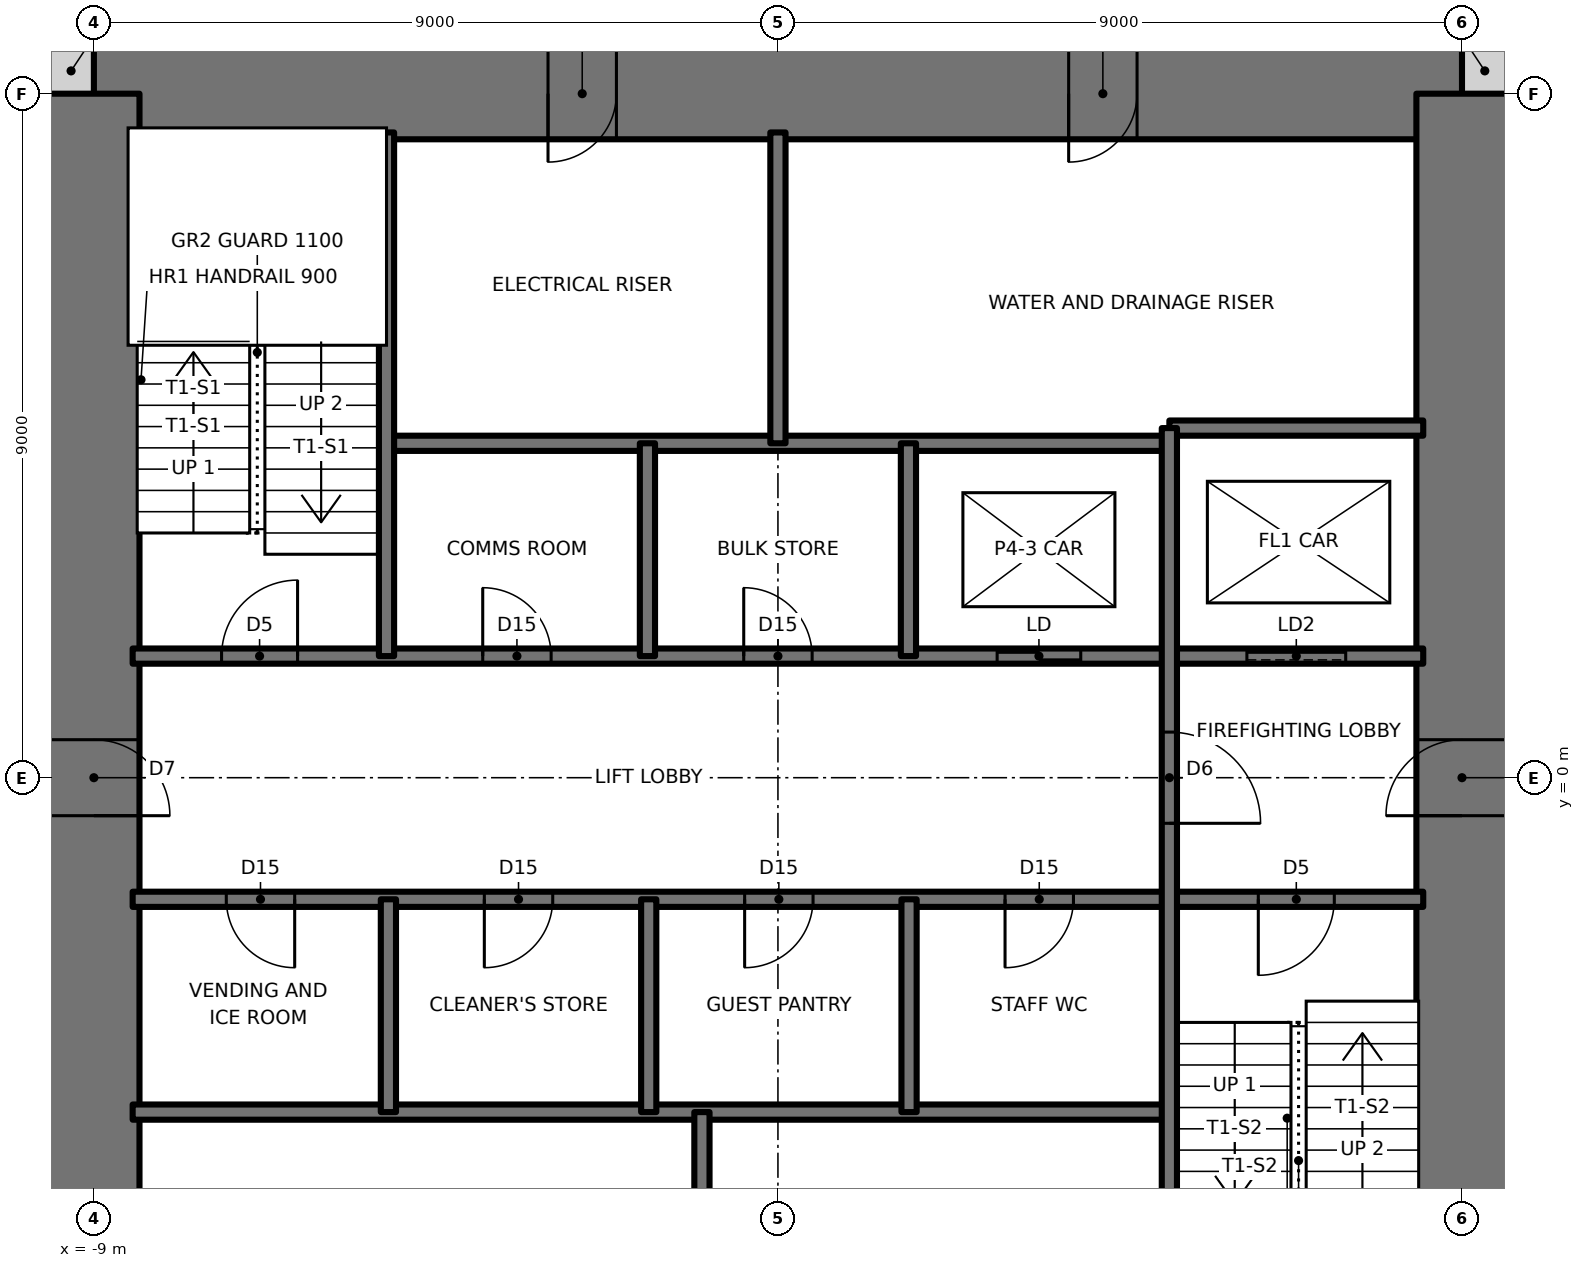
"""IFC4 building model, lengths in metres.
Left out: names, types, materials, properties, quantities, classifications, styles, units other than length and angle.
Written with IfcOpenShell. Run it as: python <this file> out.ifc"""

import sys

from ifc_helpers import new_model, si_unit, direction, frame, frame_2d, origin, place, context, subcontext, project, spatial, rectangle, extrude, element, fill, save


model = new_model("IFC4")
c1 = context("Model", 3, precision=1e-05, world=origin(), true_north=direction((0.0, 1.0)))
c2 = subcontext(c1, "Body", "Model", "MODEL_VIEW")
j1 = project(units=[si_unit("LENGTHUNIT", "METRE"), si_unit("PLANEANGLEUNIT", "RADIAN")], contexts=[c1])
p1 = place(None, origin())
s1 = spatial("IfcSite", under=j1, at=p1, CompositionType="ELEMENT")
p2 = place(p1, origin())
s2 = spatial("IfcBuilding", under=s1, at=p2, CompositionType="ELEMENT")
p3 = place(p2, frame((0.0, 0.0, 215.0)))
s3 = spatial("IfcBuildingStorey", under=s2, at=p3, CompositionType="ELEMENT", Elevation=215.0)
for number, where, z_axis, x_axis in (
    (1, (9.0, 9.3, 0.0), (0.0, 0.0, 1.0), (1.0, 0.0, 0.0)),
    (2, (-9.6, 9.3, 0.0), (0.0, 0.0, 1.0), (1.0, 0.0, 0.0)),
):
    element("IfcWall", number, at=place(p3, frame(where, z_axis=z_axis, x_axis=x_axis)), inside=s3, PredefinedType="SOLIDWALL", context=c2, shape_type="SweptSolid", body=[
        extrude(rectangle(XDim=0.6, YDim=0.6, at=frame_2d((0.3, 0.0))), origin(), (0.0, 0.0, 1.0), 3.5),
    ])
p4 = place(p3, frame((9.0, 9.0, 0.0), z_axis=(0.0, 0.0, 1.0), x_axis=(-1.0, 0.0, 0.0)))
e3 = element("IfcWall", 3, at=p4, inside=s3, PredefinedType="SHEAR", context=c2, shape_type="SweptSolid", body=[
    extrude(rectangle(XDim=18.0, YDim=1.2, at=frame_2d((9.0, 0.0))), origin(), (0.0, 0.0, 1.0), 3.5),
])
p5 = place(p4, frame((11.125, 0.0, 0.0)))
e4 = element("IfcOpeningElement", 4, at=p5, cuts=e3, PredefinedType="OPENING", context=c2, shape_type="SweptSolid", body=[
    extrude(rectangle(XDim=0.9, YDim=2.1, at=frame_2d((0.45, 1.05))), frame((0.0, 0.61, 0.0), z_axis=(0.0, -1.0, 0.0), x_axis=(1.0, 0.0, 0.0)), (0.0, 0.0, 1.0), 1.22),
])
p6 = place(p4, frame((4.275, 0.0, 0.0)))
e5 = element("IfcOpeningElement", 5, at=p6, cuts=e3, PredefinedType="OPENING", context=c2, shape_type="SweptSolid", body=[
    extrude(rectangle(XDim=0.9, YDim=2.1, at=frame_2d((0.45, 1.05))), frame((0.0, 0.61, 0.0), z_axis=(0.0, -1.0, 0.0), x_axis=(1.0, 0.0, 0.0)), (0.0, 0.0, 1.0), 1.22),
])
p7 = place(p3, frame((9.0, -9.0, 0.0), z_axis=(0.0, 0.0, 1.0), x_axis=(0.0, 1.0, 0.0)))
e6 = element("IfcWall", 6, at=p7, inside=s3, PredefinedType="SHEAR", context=c2, shape_type="SweptSolid", body=[
    extrude(rectangle(XDim=18.0, YDim=1.2, at=frame_2d((9.0, 0.0))), origin(), (0.0, 0.0, 1.0), 3.5),
])
p8 = place(p7, frame((8.5, 0.0, 0.0)))
e7 = element("IfcOpeningElement", 7, at=p8, cuts=e6, PredefinedType="OPENING", context=c2, shape_type="SweptSolid", body=[
    extrude(rectangle(XDim=1.0, YDim=2.1, at=frame_2d((0.5, 1.05))), frame((0.0, 0.61, 0.0), z_axis=(0.0, -1.0, 0.0), x_axis=(1.0, 0.0, 0.0)), (0.0, 0.0, 1.0), 1.22),
])
p9 = place(p3, frame((-9.0, 9.0, 0.0), z_axis=(0.0, 0.0, 1.0), x_axis=(0.0, -1.0, 0.0)))
e8 = element("IfcWall", 8, at=p9, inside=s3, PredefinedType="SHEAR", context=c2, shape_type="SweptSolid", body=[
    extrude(rectangle(XDim=18.0, YDim=1.2, at=frame_2d((9.0, 0.0))), origin(), (0.0, 0.0, 1.0), 3.5),
])
p10 = place(p9, frame((8.5, 0.0, 0.0)))
e9 = element("IfcOpeningElement", 9, at=p10, cuts=e8, PredefinedType="OPENING", context=c2, shape_type="SweptSolid", body=[
    extrude(rectangle(XDim=1.0, YDim=2.1, at=frame_2d((0.5, 1.05))), frame((0.0, 0.61, 0.0), z_axis=(0.0, -1.0, 0.0), x_axis=(1.0, 0.0, 0.0)), (0.0, 0.0, 1.0), 1.22),
])
p11 = place(p3, frame((-8.49, -4.4, 0.0), z_axis=(0.0, 0.0, 1.0), x_axis=(1.0, 0.0, 0.0)))
e10 = element("IfcWall", 10, at=p11, inside=s3, PredefinedType="SOLIDWALL", context=c2, shape_type="SweptSolid", body=[
    extrude(rectangle(XDim=13.64, YDim=0.2, at=frame_2d((6.82, 0.0))), origin(), (0.0, 0.0, 1.0), 3.5),
])
p12 = place(p3, frame((-8.49, -1.6, 0.0), z_axis=(0.0, 0.0, 1.0), x_axis=(1.0, 0.0, 0.0)))
e11 = element("IfcWall", 11, at=p12, inside=s3, PredefinedType="SOLIDWALL", context=c2, shape_type="SweptSolid", body=[
    extrude(rectangle(XDim=16.98, YDim=0.2, at=frame_2d((8.49, 0.0))), origin(), (0.0, 0.0, 1.0), 3.5),
])
p13 = place(p12, frame((14.81, 0.0, 0.0)))
e12 = element("IfcOpeningElement", 12, at=p13, cuts=e11, PredefinedType="OPENING", context=c2, shape_type="SweptSolid", body=[
    extrude(rectangle(XDim=1.0, YDim=2.1, at=frame_2d((0.5, 1.05))), frame((0.0, 0.11, 0.0), z_axis=(0.0, -1.0, 0.0), x_axis=(1.0, 0.0, 0.0)), (0.0, 0.0, 1.0), 0.22),
])
p14 = place(p12, frame((1.232, 0.0, 0.0)))
e13 = element("IfcOpeningElement", 13, at=p14, cuts=e11, PredefinedType="OPENING", context=c2, shape_type="SweptSolid", body=[
    extrude(rectangle(XDim=0.9, YDim=2.1, at=frame_2d((0.45, 1.05))), frame((0.0, 0.11, 0.0), z_axis=(0.0, -1.0, 0.0), x_axis=(1.0, 0.0, 0.0)), (0.0, 0.0, 1.0), 0.22),
])
p15 = place(p12, frame((4.627, 0.0, 0.0)))
e14 = element("IfcOpeningElement", 14, at=p15, cuts=e11, PredefinedType="OPENING", context=c2, shape_type="SweptSolid", body=[
    extrude(rectangle(XDim=0.9, YDim=2.1, at=frame_2d((0.45, 1.05))), frame((0.0, 0.11, 0.0), z_axis=(0.0, -1.0, 0.0), x_axis=(1.0, 0.0, 0.0)), (0.0, 0.0, 1.0), 0.22),
])
p16 = place(p12, frame((8.052, 0.0, 0.0)))
e15 = element("IfcOpeningElement", 15, at=p16, cuts=e11, PredefinedType="OPENING", context=c2, shape_type="SweptSolid", body=[
    extrude(rectangle(XDim=0.9, YDim=2.1, at=frame_2d((0.45, 1.05))), frame((0.0, 0.11, 0.0), z_axis=(0.0, -1.0, 0.0), x_axis=(1.0, 0.0, 0.0)), (0.0, 0.0, 1.0), 0.22),
])
p17 = place(p12, frame((11.478, 0.0, 0.0)))
e16 = element("IfcOpeningElement", 16, at=p17, cuts=e11, PredefinedType="OPENING", context=c2, shape_type="SweptSolid", body=[
    extrude(rectangle(XDim=0.9, YDim=2.1, at=frame_2d((0.45, 1.05))), frame((0.0, 0.11, 0.0), z_axis=(0.0, -1.0, 0.0), x_axis=(1.0, 0.0, 0.0)), (0.0, 0.0, 1.0), 0.22),
])
p18 = place(p3, frame((-8.49, 1.6, 0.0), z_axis=(0.0, 0.0, 1.0), x_axis=(1.0, 0.0, 0.0)))
e17 = element("IfcWall", 17, at=p18, inside=s3, PredefinedType="SOLIDWALL", context=c2, shape_type="SweptSolid", body=[
    extrude(rectangle(XDim=16.98, YDim=0.2, at=frame_2d((8.49, 0.0))), origin(), (0.0, 0.0, 1.0), 3.5),
])
p19 = place(p18, frame((1.17, 0.0, 0.0)))
e18 = element("IfcOpeningElement", 18, at=p19, cuts=e17, PredefinedType="OPENING", context=c2, shape_type="SweptSolid", body=[
    extrude(rectangle(XDim=1.0, YDim=2.1, at=frame_2d((0.5, 1.05))), frame((0.0, 0.11, 0.0), z_axis=(0.0, -1.0, 0.0), x_axis=(1.0, 0.0, 0.0)), (0.0, 0.0, 1.0), 0.22),
])
p20 = place(p18, frame((4.606, 0.0, 0.0)))
e19 = element("IfcOpeningElement", 19, at=p20, cuts=e17, PredefinedType="OPENING", context=c2, shape_type="SweptSolid", body=[
    extrude(rectangle(XDim=0.9, YDim=2.1, at=frame_2d((0.45, 1.05))), frame((0.0, 0.11, 0.0), z_axis=(0.0, -1.0, 0.0), x_axis=(1.0, 0.0, 0.0)), (0.0, 0.0, 1.0), 0.22),
])
p21 = place(p18, frame((8.04, 0.0, 0.0)))
e20 = element("IfcOpeningElement", 20, at=p21, cuts=e17, PredefinedType="OPENING", context=c2, shape_type="SweptSolid", body=[
    extrude(rectangle(XDim=0.9, YDim=2.1, at=frame_2d((0.45, 1.05))), frame((0.0, 0.11, 0.0), z_axis=(0.0, -1.0, 0.0), x_axis=(1.0, 0.0, 0.0)), (0.0, 0.0, 1.0), 0.22),
])
p22 = place(p18, frame((11.374, 0.0, 0.0)))
e21 = element("IfcOpeningElement", 21, at=p22, cuts=e17, PredefinedType="OPENING", context=c2, shape_type="SweptSolid", body=[
    extrude(rectangle(XDim=1.1, YDim=2.1, at=frame_2d((0.55, 1.05))), frame((0.0, 0.11, 0.0), z_axis=(0.0, -1.0, 0.0), x_axis=(1.0, 0.0, 0.0)), (0.0, 0.0, 1.0), 0.22),
])
p23 = place(p18, frame((14.66, 0.0, 0.0)))
e22 = element("IfcOpeningElement", 22, at=p23, cuts=e17, PredefinedType="OPENING", context=c2, shape_type="SweptSolid", body=[
    extrude(rectangle(XDim=1.3, YDim=2.1, at=frame_2d((0.65, 1.05))), frame((0.0, 0.11, 0.0), z_axis=(0.0, -1.0, 0.0), x_axis=(1.0, 0.0, 0.0)), (0.0, 0.0, 1.0), 0.22),
])
p24 = place(p3, frame((-5.15, 4.4, 0.0), z_axis=(0.0, 0.0, 1.0), x_axis=(1.0, 0.0, 0.0)))
e23 = element("IfcWall", 23, at=p24, inside=s3, PredefinedType="SOLIDWALL", context=c2, shape_type="SweptSolid", body=[
    extrude(rectangle(XDim=10.3, YDim=0.2, at=frame_2d((5.15, 0.0))), origin(), (0.0, 0.0, 1.0), 3.5),
])
p25 = place(p3, frame((5.15, 4.6, 0.0), z_axis=(0.0, 0.0, 1.0), x_axis=(1.0, 0.0, 0.0)))
e24 = element("IfcWall", 24, at=p25, inside=s3, PredefinedType="SOLIDWALL", context=c2, shape_type="SweptSolid", body=[
    extrude(rectangle(XDim=3.34, YDim=0.2, at=frame_2d((1.67, 0.0))), origin(), (0.0, 0.0, 1.0), 3.5),
])
p26 = place(p3, frame((5.15, -8.49, 0.0), z_axis=(0.0, 0.0, 1.0), x_axis=(0.0, 1.0, 0.0)))
e25 = element("IfcWall", 25, at=p26, inside=s3, PredefinedType="SOLIDWALL", context=c2, shape_type="SweptSolid", body=[
    extrude(rectangle(XDim=13.09, YDim=0.2, at=frame_2d((6.545, 0.0))), origin(), (0.0, 0.0, 1.0), 3.5),
])
p27 = place(p26, frame((7.89, 0.0, 0.0)))
e26 = element("IfcOpeningElement", 26, at=p27, cuts=e25, PredefinedType="OPENING", context=c2, shape_type="SweptSolid", body=[
    extrude(rectangle(XDim=1.2, YDim=2.1, at=frame_2d((0.6, 1.05))), frame((0.0, 0.11, 0.0), z_axis=(0.0, -1.0, 0.0), x_axis=(1.0, 0.0, 0.0)), (0.0, 0.0, 1.0), 0.22),
])
for number, where, z_axis, x_axis in (
    (27, (1.725, -4.4, 0.0), (0.0, 0.0, 1.0), (0.0, 1.0, 0.0)),
    (28, (1.717, 1.6, 0.0), (0.0, 0.0, 1.0), (0.0, 1.0, 0.0)),
):
    element("IfcWall", number, at=place(p3, frame(where, z_axis=z_axis, x_axis=x_axis)), inside=s3, PredefinedType="SOLIDWALL", context=c2, shape_type="SweptSolid", body=[
        extrude(rectangle(XDim=2.8, YDim=0.2, at=frame_2d((1.4, 0.0))), origin(), (0.0, 0.0, 1.0), 3.5),
    ])
for number, where, z_axis, x_axis in (
    (29, (0.0, 4.4, 0.0), (0.0, 0.0, 1.0), (0.0, 1.0, 0.0)),
    (30, (-1.0, -8.49, 0.0), (0.0, 0.0, 1.0), (0.0, 1.0, 0.0)),
):
    element("IfcWall", number, at=place(p3, frame(where, z_axis=z_axis, x_axis=x_axis)), inside=s3, PredefinedType="SOLIDWALL", context=c2, shape_type="SweptSolid", body=[
        extrude(rectangle(XDim=4.09, YDim=0.2, at=frame_2d((2.045, 0.0))), origin(), (0.0, 0.0, 1.0), 3.5),
    ])
for number, where, z_axis, x_axis in (
    (31, (-1.7, -4.4, 0.0), (0.0, 0.0, 1.0), (0.0, 1.0, 0.0)),
    (32, (-1.717, 1.6, 0.0), (0.0, 0.0, 1.0), (0.0, 1.0, 0.0)),
    (33, (-5.125, -4.4, 0.0), (0.0, 0.0, 1.0), (0.0, 1.0, 0.0)),
):
    element("IfcWall", number, at=place(p3, frame(where, z_axis=z_axis, x_axis=x_axis)), inside=s3, PredefinedType="SOLIDWALL", context=c2, shape_type="SweptSolid", body=[
        extrude(rectangle(XDim=2.8, YDim=0.2, at=frame_2d((1.4, 0.0))), origin(), (0.0, 0.0, 1.0), 3.5),
    ])
p28 = place(p3, frame((-5.15, 1.6, 0.0), z_axis=(0.0, 0.0, 1.0), x_axis=(0.0, 1.0, 0.0)))
e34 = element("IfcWall", 34, at=p28, inside=s3, PredefinedType="SOLIDWALL", context=c2, shape_type="SweptSolid", body=[
    extrude(rectangle(XDim=6.89, YDim=0.2, at=frame_2d((3.445, 0.0))), origin(), (0.0, 0.0, 1.0), 3.5),
])
p29 = place(p19, origin())
e35 = element("IfcDoor", 35, at=p29, inside=s3, OperationType="SINGLE_SWING_RIGHT", PredefinedType="DOOR", context=c2, shape_type="SweptSolid", body=[
    extrude(rectangle(XDim=1.0, YDim=2.1, at=frame_2d((0.5, 1.05))), frame((0.0, 0.025, 0.0), z_axis=(0.0, -1.0, 0.0), x_axis=(1.0, 0.0, 0.0)), (0.0, 0.0, 1.0), 0.05),
])
fill(e18, e35)
p30 = place(p13, frame((1.0, 0.0, 0.0), z_axis=(0.0, 0.0, 1.0), x_axis=(-1.0, 0.0, 0.0)))
e36 = element("IfcDoor", 36, at=p30, inside=s3, OperationType="SINGLE_SWING_RIGHT", PredefinedType="DOOR", context=c2, shape_type="SweptSolid", body=[
    extrude(rectangle(XDim=1.0, YDim=2.1, at=frame_2d((0.5, 1.05))), frame((0.0, 0.025, 0.0), z_axis=(0.0, -1.0, 0.0), x_axis=(1.0, 0.0, 0.0)), (0.0, 0.0, 1.0), 0.05),
])
fill(e12, e36)
p31 = place(p27, frame((1.2, 0.0, 0.0), z_axis=(0.0, 0.0, 1.0), x_axis=(-1.0, 0.0, 0.0)))
e37 = element("IfcDoor", 37, at=p31, inside=s3, OperationType="SINGLE_SWING_RIGHT", PredefinedType="DOOR", context=c2, shape_type="SweptSolid", body=[
    extrude(rectangle(XDim=1.2, YDim=2.1, at=frame_2d((0.6, 1.05))), frame((0.0, 0.025, 0.0), z_axis=(0.0, -1.0, 0.0), x_axis=(1.0, 0.0, 0.0)), (0.0, 0.0, 1.0), 0.05),
])
fill(e26, e37)
p32 = place(p20, origin())
e38 = element("IfcDoor", 38, at=p32, inside=s3, OperationType="SINGLE_SWING_LEFT", PredefinedType="DOOR", context=c2, shape_type="SweptSolid", body=[
    extrude(rectangle(XDim=0.9, YDim=2.1, at=frame_2d((0.45, 1.05))), frame((0.0, 0.025, 0.0), z_axis=(0.0, -1.0, 0.0), x_axis=(1.0, 0.0, 0.0)), (0.0, 0.0, 1.0), 0.05),
])
fill(e19, e38)
p33 = place(p21, origin())
e39 = element("IfcDoor", 39, at=p33, inside=s3, OperationType="SINGLE_SWING_LEFT", PredefinedType="DOOR", context=c2, shape_type="SweptSolid", body=[
    extrude(rectangle(XDim=0.9, YDim=2.1, at=frame_2d((0.45, 1.05))), frame((0.0, 0.025, 0.0), z_axis=(0.0, -1.0, 0.0), x_axis=(1.0, 0.0, 0.0)), (0.0, 0.0, 1.0), 0.05),
])
fill(e20, e39)
p34 = place(p14, frame((0.9, 0.0, 0.0), z_axis=(0.0, 0.0, 1.0), x_axis=(-1.0, 0.0, 0.0)))
e40 = element("IfcDoor", 40, at=p34, inside=s3, OperationType="SINGLE_SWING_LEFT", PredefinedType="DOOR", context=c2, shape_type="SweptSolid", body=[
    extrude(rectangle(XDim=0.9, YDim=2.1, at=frame_2d((0.45, 1.05))), frame((0.0, 0.025, 0.0), z_axis=(0.0, -1.0, 0.0), x_axis=(1.0, 0.0, 0.0)), (0.0, 0.0, 1.0), 0.05),
])
fill(e13, e40)
p35 = place(p15, frame((0.9, 0.0, 0.0), z_axis=(0.0, 0.0, 1.0), x_axis=(-1.0, 0.0, 0.0)))
e41 = element("IfcDoor", 41, at=p35, inside=s3, OperationType="SINGLE_SWING_RIGHT", PredefinedType="DOOR", context=c2, shape_type="SweptSolid", body=[
    extrude(rectangle(XDim=0.9, YDim=2.1, at=frame_2d((0.45, 1.05))), frame((0.0, 0.025, 0.0), z_axis=(0.0, -1.0, 0.0), x_axis=(1.0, 0.0, 0.0)), (0.0, 0.0, 1.0), 0.05),
])
fill(e14, e41)
p36 = place(p16, frame((0.9, 0.0, 0.0), z_axis=(0.0, 0.0, 1.0), x_axis=(-1.0, 0.0, 0.0)))
e42 = element("IfcDoor", 42, at=p36, inside=s3, OperationType="SINGLE_SWING_RIGHT", PredefinedType="DOOR", context=c2, shape_type="SweptSolid", body=[
    extrude(rectangle(XDim=0.9, YDim=2.1, at=frame_2d((0.45, 1.05))), frame((0.0, 0.025, 0.0), z_axis=(0.0, -1.0, 0.0), x_axis=(1.0, 0.0, 0.0)), (0.0, 0.0, 1.0), 0.05),
])
fill(e15, e42)
p37 = place(p17, frame((0.9, 0.0, 0.0), z_axis=(0.0, 0.0, 1.0), x_axis=(-1.0, 0.0, 0.0)))
e43 = element("IfcDoor", 43, at=p37, inside=s3, OperationType="SINGLE_SWING_RIGHT", PredefinedType="DOOR", context=c2, shape_type="SweptSolid", body=[
    extrude(rectangle(XDim=0.9, YDim=2.1, at=frame_2d((0.45, 1.05))), frame((0.0, 0.025, 0.0), z_axis=(0.0, -1.0, 0.0), x_axis=(1.0, 0.0, 0.0)), (0.0, 0.0, 1.0), 0.05),
])
fill(e16, e43)
p38 = place(p10, origin())
e44 = element("IfcDoor", 44, at=p38, inside=s3, OperationType="SINGLE_SWING_RIGHT", PredefinedType="DOOR", context=c2, shape_type="SweptSolid", body=[
    extrude(rectangle(XDim=1.0, YDim=2.1, at=frame_2d((0.5, 1.05))), frame((0.0, 0.025, 0.0), z_axis=(0.0, -1.0, 0.0), x_axis=(1.0, 0.0, 0.0)), (0.0, 0.0, 1.0), 0.05),
])
fill(e9, e44)
p39 = place(p8, origin())
e45 = element("IfcDoor", 45, at=p39, inside=s3, OperationType="SINGLE_SWING_LEFT", PredefinedType="DOOR", context=c2, shape_type="SweptSolid", body=[
    extrude(rectangle(XDim=1.0, YDim=2.1, at=frame_2d((0.5, 1.05))), frame((0.0, 0.025, 0.0), z_axis=(0.0, -1.0, 0.0), x_axis=(1.0, 0.0, 0.0)), (0.0, 0.0, 1.0), 0.05),
])
fill(e7, e45)
p40 = place(p5, origin())
e46 = element("IfcDoor", 46, at=p40, inside=s3, OperationType="SINGLE_SWING_RIGHT", PredefinedType="DOOR", context=c2, shape_type="SweptSolid", body=[
    extrude(rectangle(XDim=0.9, YDim=2.1, at=frame_2d((0.45, 1.05))), frame((0.0, 0.025, 0.0), z_axis=(0.0, -1.0, 0.0), x_axis=(1.0, 0.0, 0.0)), (0.0, 0.0, 1.0), 0.05),
])
fill(e4, e46)
p41 = place(p6, origin())
e47 = element("IfcDoor", 47, at=p41, inside=s3, OperationType="SINGLE_SWING_RIGHT", PredefinedType="DOOR", context=c2, shape_type="SweptSolid", body=[
    extrude(rectangle(XDim=0.9, YDim=2.1, at=frame_2d((0.45, 1.05))), frame((0.0, 0.025, 0.0), z_axis=(0.0, -1.0, 0.0), x_axis=(1.0, 0.0, 0.0)), (0.0, 0.0, 1.0), 0.05),
])
fill(e5, e47)
p42 = place(p22, origin())
e48 = element("IfcDoor", 48, at=p42, inside=s3, OperationType="DOUBLE_DOOR_SLIDING", PredefinedType="DOOR", context=c2, shape_type="SweptSolid", body=[
    extrude(rectangle(XDim=1.1, YDim=2.1, at=frame_2d((0.55, 1.05))), frame((0.0, 0.025, 0.0), z_axis=(0.0, -1.0, 0.0), x_axis=(1.0, 0.0, 0.0)), (0.0, 0.0, 1.0), 0.05),
])
fill(e21, e48)
p43 = place(p23, origin())
e49 = element("IfcDoor", 49, at=p43, inside=s3, OperationType="SLIDING_TO_LEFT", PredefinedType="DOOR", context=c2, shape_type="SweptSolid", body=[
    extrude(rectangle(XDim=1.3, YDim=2.1, at=frame_2d((0.65, 1.05))), frame((0.0, 0.025, 0.0), z_axis=(0.0, -1.0, 0.0), x_axis=(1.0, 0.0, 0.0)), (0.0, 0.0, 1.0), 0.05),
])
fill(e22, e49)
save(model, sys.argv[1])
